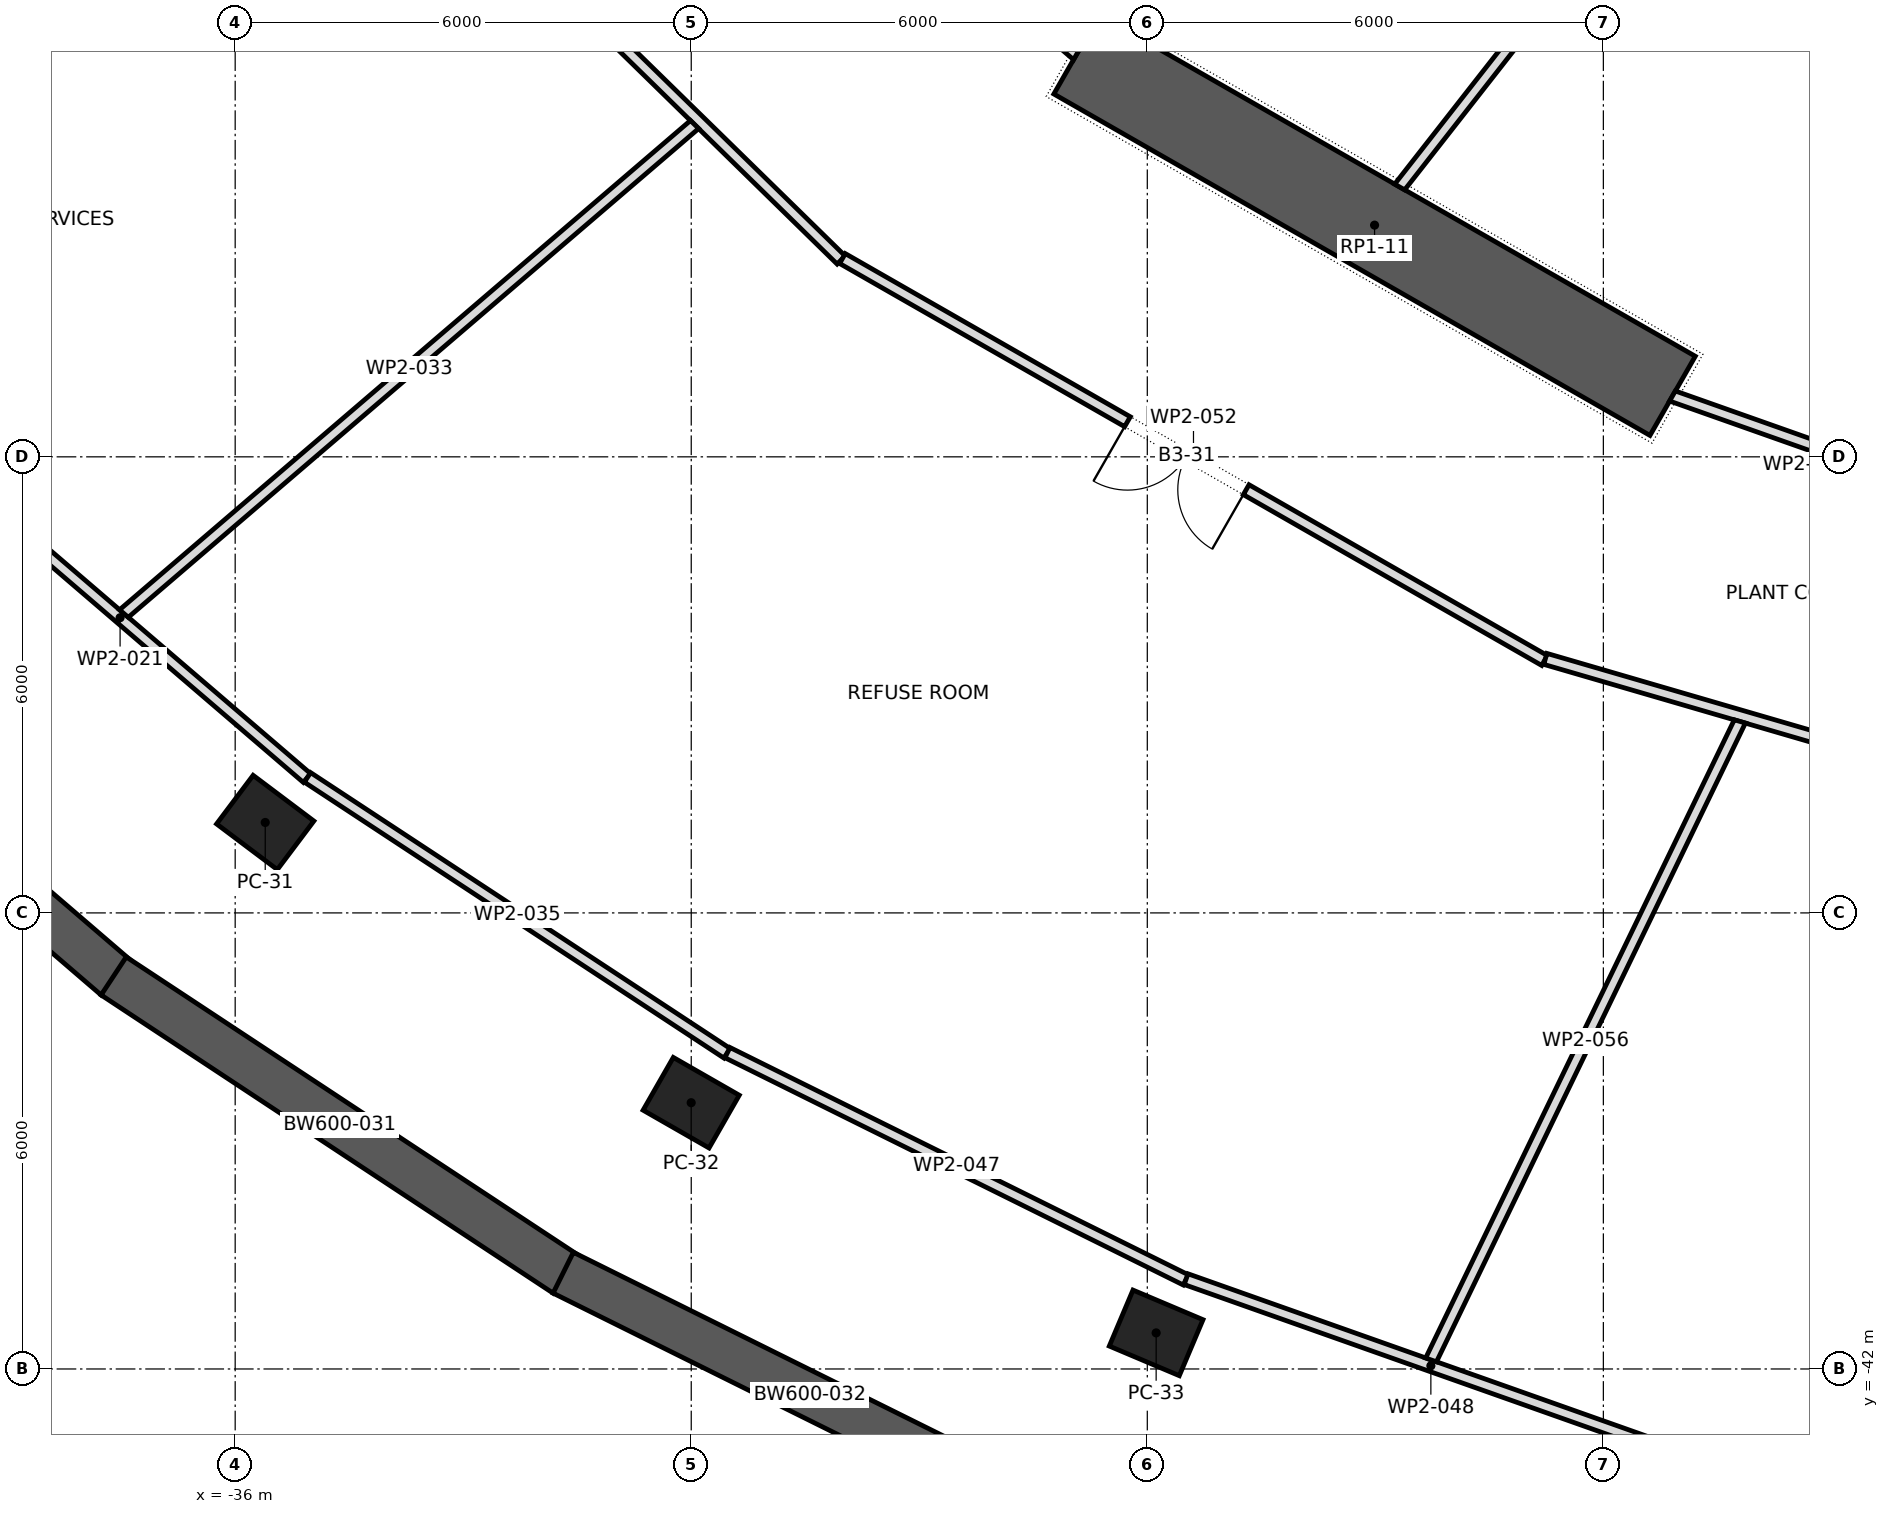
"""IFC4 building model, lengths in metres.
Left out: names, types, materials, properties, quantities, classifications, styles, units other than length and angle.
Written with IfcOpenShell. Run it as: python <this file> out.ifc"""

import sys

from ifc_helpers import new_model, si_unit, direction, frame, frame_2d, origin, origin_2d, place, context, subcontext, project, spatial, polyline, rectangle, outline, extrude, element, fill, save


model = new_model("IFC4")
c1 = context("Model", 3, precision=1e-05, world=origin(), true_north=direction((0.0, 1.0)))
c2 = subcontext(c1, "Body", "Model", "MODEL_VIEW")
j1 = project(units=[si_unit("LENGTHUNIT", "METRE"), si_unit("PLANEANGLEUNIT", "RADIAN")], contexts=[c1])
p1 = place(None, origin())
s1 = spatial("IfcSite", under=j1, at=p1, CompositionType="ELEMENT")
p2 = place(p1, origin())
s2 = spatial("IfcBuilding", under=s1, at=p2, CompositionType="ELEMENT")
p3 = place(p2, frame((0.0, 0.0, -15.0)))
s3 = spatial("IfcBuildingStorey", under=s2, at=p3, CompositionType="ELEMENT", Elevation=-15.0)
for number, where, z_axis, x_axis in (
    (1, (-35.605, -34.81, -0.4), (0.0, 0.0, 1.0), (0.799, -0.601, 0.0)),
    (2, (-30.001, -38.497, -0.4), (0.0, 0.0, 1.0), (0.868, -0.497, 0.0)),
    (3, (-23.884, -41.525, -0.4), (0.0, 0.0, 1.0), (0.921, -0.389, 0.0)),
):
    element("IfcColumn", number, at=place(p3, frame(where, z_axis=z_axis, x_axis=x_axis)), inside=s3, PredefinedType="COLUMN", context=c2, shape_type="SweptSolid", body=[
        extrude(rectangle(XDim=1.0, YDim=0.8, at=origin_2d()), origin(), (0.0, 0.0, 1.0), 5.9),
    ])
p4 = place(p3, frame((-24.931, -24.706, -0.4), z_axis=(0.0, 0.0, 1.0), x_axis=(0.867760656864, -0.496982336103, 0.0)))
e4 = element("IfcWall", 4, at=p4, inside=s3, PredefinedType="SHEAR", context=c2, shape_type="SweptSolid", body=[
    extrude(rectangle(XDim=9.038, YDim=1.2, at=frame_2d((4.519, 0.0))), origin(), (0.0, 0.0, 1.0), 5.9),
])
p5 = place(p3, frame((-42.87, -32.295, -0.4), z_axis=(0.0, 0.0, 1.0), x_axis=(0.758319142722, -0.65188348482, 0.0)))
e5 = element("IfcWall", 5, at=p5, inside=s3, PredefinedType="SOLIDWALL", context=c2, shape_type="SweptSolid", body=[
    extrude(rectangle(XDim=6.991, YDim=0.6, at=frame_2d((3.496, 0.0))), origin(), (0.0, 0.0, 1.0), 5.9),
])
p6 = place(p3, frame((-37.599, -36.83, -0.4), z_axis=(0.0, 0.0, 1.0), x_axis=(0.834745196239, -0.550636411215, 0.0)))
e6 = element("IfcWall", 6, at=p6, inside=s3, PredefinedType="SOLIDWALL", context=c2, shape_type="SweptSolid", body=[
    extrude(rectangle(XDim=7.124, YDim=0.6, at=frame_2d((3.562, 0.0))), origin(), (0.0, 0.0, 1.0), 5.9),
])
p7 = place(p3, frame((-31.684, -40.734, -0.4), z_axis=(0.0, 0.0, 1.0), x_axis=(0.895750986496, -0.44455614965, 0.0)))
e7 = element("IfcWall", 7, at=p7, inside=s3, PredefinedType="SOLIDWALL", context=c2, shape_type="SweptSolid", body=[
    extrude(rectangle(XDim=7.245, YDim=0.6, at=frame_2d((3.623, 0.0))), origin(), (0.0, 0.0, 1.0), 5.9),
])
p8 = place(p3, frame((-39.973, -30.007, 0.0), z_axis=(0.0, 0.0, 1.0), x_axis=(0.759038455419, -0.651045791934, 0.0)))
e8 = element("IfcWall", 8, at=p8, inside=s3, PredefinedType="PARTITIONING", context=c2, shape_type="SweptSolid", body=[
    extrude(rectangle(XDim=6.479, YDim=0.15, at=frame_2d((3.24, 0.0))), origin(), (0.0, 0.0, 1.0), 5.15),
])
p9 = place(p3, frame((-35.389, -20.211, 0.0), z_axis=(0.0, 0.0, 1.0), x_axis=(0.714900505887, -0.699226191359, 0.0)))
e9 = element("IfcWall", 9, at=p9, inside=s3, PredefinedType="PARTITIONING", context=c2, shape_type="SweptSolid", body=[
    extrude(rectangle(XDim=10.296, YDim=0.15, at=frame_2d((5.148, 0.0))), origin(), (0.0, 0.0, 1.0), 5.15),
])
p10 = place(p9, frame((3.353, 0.0, 0.0)))
e10 = element("IfcOpeningElement", 10, at=p10, cuts=e9, PredefinedType="OPENING", context=c2, shape_type="SweptSolid", body=[
    extrude(rectangle(XDim=1.0, YDim=2.1, at=frame_2d((0.5, 1.05))), frame((0.0, 0.087, 0.0), z_axis=(0.0, -1.0, 0.0), x_axis=(1.0, 0.0, 0.0)), (0.0, 0.0, 1.0), 0.174),
])
p11 = place(p3, frame((-29.956, -25.628, 0.0), z_axis=(0.0, 0.0, 1.0), x_axis=(-0.759329804597, -0.650705961131, 0.0)))
e11 = element("IfcWall", 11, at=p11, inside=s3, PredefinedType="PARTITIONING", context=c2, shape_type="SweptSolid", body=[
    extrude(outline(polyline([(0.007, -0.075), (9.899, -0.075), (9.876, 0.075), (-0.007, 0.075), (0.007, -0.075)])), origin(), (0.0, 0.0, 1.0), 5.15),
])
p12 = place(p3, frame((-29.529, -37.847, 0.0), z_axis=(0.0, 0.0, 1.0), x_axis=(-0.83553583791, 0.549435950378, 0.0)))
e12 = element("IfcWall", 12, at=p12, inside=s3, PredefinedType="PARTITIONING", context=c2, shape_type="SweptSolid", body=[
    extrude(rectangle(XDim=6.606, YDim=0.15, at=frame_2d((3.303, 0.0))), origin(), (0.0, 0.0, 1.0), 5.15),
])
p13 = place(p3, frame((-28.789, -21.411, 0.0), z_axis=(0.0, 0.0, 1.0), x_axis=(0.760084552743, -0.649824185978, 0.0)))
e13 = element("IfcWall", 13, at=p13, inside=s3, PredefinedType="PARTITIONING", context=c2, shape_type="SweptSolid", body=[
    extrude(outline(polyline([(-0.015, -0.075), (5.089, -0.075), (5.061, 0.075), (0.015, 0.075), (-0.015, -0.075)])), origin(), (0.0, 0.0, 1.0), 4.6),
])
p14 = place(p3, frame((-23.493, -40.828, 0.0), z_axis=(0.0, 0.0, 1.0), x_axis=(-0.895909442692, 0.444236727991, 0.0)))
e14 = element("IfcWall", 14, at=p14, inside=s3, PredefinedType="PARTITIONING", context=c2, shape_type="SweptSolid", body=[
    extrude(rectangle(XDim=6.731, YDim=0.15, at=frame_2d((3.365, 0.0))), origin(), (0.0, 0.0, 1.0), 5.15),
])
p15 = place(p3, frame((-23.49, -40.819, 0.0), z_axis=(0.0, 0.0, 1.0), x_axis=(0.942678523295, -0.333702265079, 0.0)))
e15 = element("IfcWall", 15, at=p15, inside=s3, PredefinedType="PARTITIONING", context=c2, shape_type="SweptSolid", body=[
    extrude(rectangle(XDim=6.832, YDim=0.15, at=frame_2d((3.416, 0.0))), origin(), (0.0, 0.0, 1.0), 5.15),
])
p16 = place(p3, frame((-20.68, -26.45, 0.0), z_axis=(0.0, 0.0, 1.0), x_axis=(0.616465586388, 0.787381851962, 0.0)))
e16 = element("IfcWall", 16, at=p16, inside=s3, PredefinedType="PARTITIONING", context=c2, shape_type="SweptSolid", body=[
    extrude(outline(polyline([(0.011, -0.075), (14.1, -0.075), (14.1, 0.075), (-0.011, 0.075), (0.011, -0.075)])), origin(), (0.0, 0.0, 1.0), 5.15),
])
p17 = place(p3, frame((-18.774, -32.679, 0.0), z_axis=(0.0, 0.0, 1.0), x_axis=(-0.867830645151, 0.496860112444, 0.0)))
e17 = element("IfcWall", 17, at=p17, inside=s3, PredefinedType="PARTITIONING", context=c2, shape_type="SweptSolid", body=[
    extrude(rectangle(XDim=10.643, YDim=0.15, at=frame_2d((5.322, 0.0))), origin(), (0.0, 0.0, 1.0), 5.15),
])
p18 = place(p17, frame((4.523, 0.0, 0.0)))
e18 = element("IfcOpeningElement", 18, at=p18, cuts=e17, PredefinedType="OPENING", context=c2, shape_type="SweptSolid", body=[
    extrude(rectangle(XDim=1.8, YDim=2.1, at=frame_2d((0.9, 1.05))), frame((0.0, 0.087, 0.0), z_axis=(0.0, -1.0, 0.0), x_axis=(1.0, 0.0, 0.0)), (0.0, 0.0, 1.0), 0.174),
])
p19 = place(p3, frame((-18.763, -32.658, 0.0), z_axis=(0.0, 0.0, 1.0), x_axis=(0.960103579148, -0.279644626818, 0.0)))
e19 = element("IfcWall", 19, at=p19, inside=s3, PredefinedType="PARTITIONING", context=c2, shape_type="SweptSolid", body=[
    extrude(rectangle(XDim=10.975, YDim=0.15, at=frame_2d((5.487, 0.0))), origin(), (0.0, 0.0, 1.0), 5.15),
])
p20 = place(p3, frame((-17.091, -29.2, 0.0), z_axis=(0.0, 0.0, 1.0), x_axis=(0.942814385805, -0.333318217204, 0.0)))
e20 = element("IfcWall", 20, at=p20, inside=s3, PredefinedType="PARTITIONING", context=c2, shape_type="SweptSolid", body=[
    extrude(outline(polyline([(-0.014, -0.075), (5.448, -0.075), (5.422, 0.075), (0.014, 0.075), (-0.014, -0.075)])), origin(), (0.0, 0.0, 1.0), 4.6),
])
p21 = place(p3, frame((-16.204, -33.481, 0.0), z_axis=(0.0, 0.0, 1.0), x_axis=(-0.435389941519, -0.90024196682, 0.0)))
e21 = element("IfcWall", 21, at=p21, inside=s3, PredefinedType="PARTITIONING", context=c2, shape_type="SweptSolid", body=[
    extrude(outline(polyline([(0.013, -0.075), (9.339, -0.075), (9.323, 0.075), (-0.013, 0.075), (0.013, -0.075)])), origin(), (0.0, 0.0, 1.0), 5.15),
])
p22 = place(p18, origin())
e22 = element("IfcDoor", 22, at=p22, inside=s3, OperationType="DOUBLE_DOOR_SINGLE_SWING", PredefinedType="DOOR", context=c2, shape_type="SweptSolid", body=[
    extrude(rectangle(XDim=1.8, YDim=2.1, at=frame_2d((0.9, 1.05))), frame((0.0, 0.025, 0.0), z_axis=(0.0, -1.0, 0.0), x_axis=(1.0, 0.0, 0.0)), (0.0, 0.0, 1.0), 0.05),
])
fill(e18, e22)
save(model, sys.argv[1])
